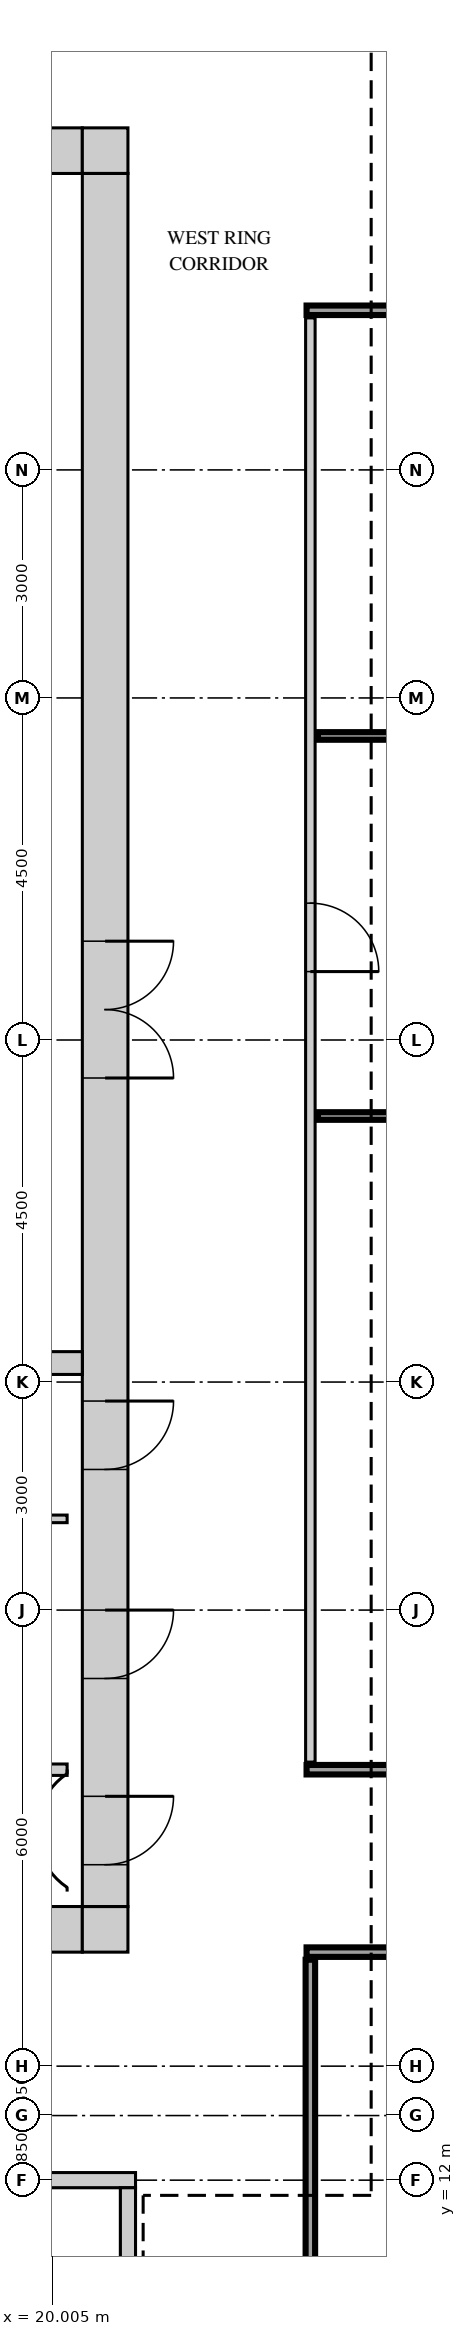
"""IFC4 building model, lengths in metres.
Left out: names, types, materials, properties, quantities, classifications, styles, units other than length and angle.
Written with IfcOpenShell. Run it as: python <this file> out.ifc"""

import sys

from ifc_helpers import new_model, si_unit, direction, frame, frame_2d, origin, place, context, subcontext, project, spatial, rectangle, extrude, source, transform, mapped, element, fill, save


model = new_model("IFC4")
c1 = context("Model", 3, precision=1e-05, world=origin(), true_north=direction((0.0, 1.0)))
c2 = subcontext(c1, "Body", "Model", "MODEL_VIEW")
j1 = project(units=[si_unit("LENGTHUNIT", "METRE"), si_unit("PLANEANGLEUNIT", "RADIAN")], contexts=[c1])
p1 = place(None, origin())
s1 = spatial("IfcSite", under=j1, at=p1, CompositionType="ELEMENT")
p2 = place(p1, origin())
s2 = spatial("IfcBuilding", under=s1, at=p2, CompositionType="ELEMENT")
p3 = place(p2, frame((0.0, 0.0, 310.2)))
s3 = spatial("IfcBuildingStorey", under=s2, at=p3, CompositionType="ELEMENT", Elevation=310.2)
m1 = source(origin(), c2, "Body", "SweptSolid", [
    extrude(rectangle(XDim=14.4, YDim=0.6, at=frame_2d((7.2, 0.0))), origin(), (0.0, 0.0, 1.0), 3.75),
])
p4 = place(p3, frame((6.0, 38.7, 0.0), z_axis=(0.0, 0.0, 1.0), x_axis=(1.0, 0.0, 0.0)))
e1 = element("IfcWall", 1, at=p4, inside=s3, PredefinedType="SHEAR", context=c2, shape_type="MappedRepresentation", body=[
    mapped(m1, transform((0.0, 0.0, 0.0))),
])
m2 = source(origin(), c2, "Body", "SweptSolid", [
    extrude(rectangle(XDim=0.9, YDim=2.1, at=frame_2d((0.45, 1.05))), frame((0.0, 0.31, 0.0), z_axis=(0.0, -1.0, 0.0), x_axis=(1.0, 0.0, 0.0)), (0.0, 0.0, 1.0), 0.62),
])
p5 = place(p4, frame((3.7, 0.0, 0.0)))
e2 = element("IfcOpeningElement", 2, at=p5, cuts=e1, PredefinedType="OPENING", context=c2, shape_type="MappedRepresentation", body=[
    mapped(m2, transform((0.0, 0.0, 0.0))),
])
p6 = place(p4, frame((10.4, 0.0, 0.0)))
e3 = element("IfcOpeningElement", 3, at=p6, cuts=e1, PredefinedType="OPENING", context=c2, shape_type="MappedRepresentation", body=[
    mapped(m2, transform((0.0, 0.0, 0.0))),
])
m3 = source(origin(), c2, "Body", "SweptSolid", [
    extrude(rectangle(XDim=0.6, YDim=0.6, at=frame_2d((0.3, 0.0))), origin(), (0.0, 0.0, 1.0), 3.75),
])
p7 = place(p3, frame((20.4, 38.7, 0.0), z_axis=(0.0, 0.0, 1.0), x_axis=(1.0, 0.0, 0.0)))
e4 = element("IfcWall", 4, at=p7, inside=s3, PredefinedType="SHEAR", context=c2, shape_type="MappedRepresentation", body=[
    mapped(m3, transform((0.0, 0.0, 0.0))),
])
p8 = place(p3, frame((6.0, 15.3, 0.0), z_axis=(0.0, 0.0, 1.0), x_axis=(1.0, 0.0, 0.0)))
e5 = element("IfcWall", 5, at=p8, inside=s3, PredefinedType="SHEAR", context=c2, shape_type="MappedRepresentation", body=[
    mapped(m1, transform((0.0, 0.0, 0.0))),
])
m4 = source(origin(), c2, "Body", "SweptSolid", [
    extrude(rectangle(XDim=1.2, YDim=2.1, at=frame_2d((0.6, 1.05))), frame((0.0, 0.31, 0.0), z_axis=(0.0, -1.0, 0.0), x_axis=(1.0, 0.0, 0.0)), (0.0, 0.0, 1.0), 0.62),
])
p9 = place(p8, frame((6.2, 0.0, 0.0)))
e6 = element("IfcOpeningElement", 6, at=p9, cuts=e5, PredefinedType="OPENING", context=c2, shape_type="MappedRepresentation", body=[
    mapped(m4, transform((0.0, 0.0, 0.0))),
])
p10 = place(p8, frame((2.85, 0.0, 0.0)))
e7 = element("IfcOpeningElement", 7, at=p10, cuts=e5, PredefinedType="OPENING", context=c2, shape_type="MappedRepresentation", body=[
    mapped(m4, transform((0.0, 0.0, 0.0))),
])
m5 = source(origin(), c2, "Body", "SweptSolid", [
    extrude(rectangle(XDim=1.0, YDim=2.1, at=frame_2d((0.5, 1.05))), frame((0.0, 0.31, 0.0), z_axis=(0.0, -1.0, 0.0), x_axis=(1.0, 0.0, 0.0)), (0.0, 0.0, 1.0), 0.62),
])
p11 = place(p8, frame((8.7, 0.0, 0.0)))
e8 = element("IfcOpeningElement", 8, at=p11, cuts=e5, PredefinedType="OPENING", context=c2, shape_type="MappedRepresentation", body=[
    mapped(m5, transform((0.0, 0.0, 0.0))),
])
p12 = place(p3, frame((20.4, 15.3, 0.0), z_axis=(0.0, 0.0, 1.0), x_axis=(1.0, 0.0, 0.0)))
e9 = element("IfcWall", 9, at=p12, inside=s3, PredefinedType="SHEAR", context=c2, shape_type="MappedRepresentation", body=[
    mapped(m3, transform((0.0, 0.0, 0.0))),
])
m6 = source(origin(), c2, "Body", "SweptSolid", [
    extrude(rectangle(XDim=22.8, YDim=0.6, at=frame_2d((11.4, 0.0))), origin(), (0.0, 0.0, 1.0), 3.75),
])
p13 = place(p3, frame((20.7, 15.6, 0.0), z_axis=(0.0, 0.0, 1.0), x_axis=(0.0, 1.0, 0.0)))
e10 = element("IfcWall", 10, at=p13, inside=s3, PredefinedType="SHEAR", context=c2, shape_type="MappedRepresentation", body=[
    mapped(m6, transform((0.0, 0.0, 0.0))),
])
m7 = source(origin(), c2, "Body", "SweptSolid", [
    extrude(rectangle(XDim=1.8, YDim=2.1, at=frame_2d((0.9, 1.05))), frame((0.0, 0.31, 0.0), z_axis=(0.0, -1.0, 0.0), x_axis=(1.0, 0.0, 0.0)), (0.0, 0.0, 1.0), 0.62),
])
p14 = place(p13, frame((10.9, 0.0, 0.0)))
e11 = element("IfcOpeningElement", 11, at=p14, cuts=e10, PredefinedType="OPENING", context=c2, shape_type="MappedRepresentation", body=[
    mapped(m7, transform((0.0, 0.0, 0.0))),
])
p15 = place(p13, frame((0.55, 0.0, 0.0)))
e12 = element("IfcOpeningElement", 12, at=p15, cuts=e10, PredefinedType="OPENING", context=c2, shape_type="MappedRepresentation", body=[
    mapped(m2, transform((0.0, 0.0, 0.0))),
])
p16 = place(p13, frame((3.0, 0.0, 0.0)))
e13 = element("IfcOpeningElement", 13, at=p16, cuts=e10, PredefinedType="OPENING", context=c2, shape_type="MappedRepresentation", body=[
    mapped(m2, transform((0.0, 0.0, 0.0))),
])
p17 = place(p13, frame((5.75, 0.0, 0.0)))
e14 = element("IfcOpeningElement", 14, at=p17, cuts=e10, PredefinedType="OPENING", context=c2, shape_type="MappedRepresentation", body=[
    mapped(m2, transform((0.0, 0.0, 0.0))),
])
m8 = source(origin(), c2, "Body", "SweptSolid", [
    extrude(rectangle(XDim=7.2, YDim=0.2, at=frame_2d((3.6, 0.0))), origin(), (0.0, 0.0, 1.0), 3.75),
])
p18 = place(p3, frame((13.9, 12.0, 0.0), z_axis=(0.0, 0.0, 1.0), x_axis=(1.0, 0.0, 0.0)))
e15 = element("IfcWall", 15, at=p18, inside=s3, PredefinedType="SHEAR", context=c2, shape_type="MappedRepresentation", body=[
    mapped(m8, transform((0.0, 0.0, 0.0))),
])
m9 = source(origin(), c2, "Body", "SweptSolid", [
    extrude(rectangle(XDim=3.35, YDim=0.2, at=frame_2d((1.675, 0.0))), origin(), (0.0, 0.0, 1.0), 3.75),
])
p19 = place(p3, frame((21.0, 8.55, 0.0), z_axis=(0.0, 0.0, 1.0), x_axis=(0.0, 1.0, 0.0)))
e16 = element("IfcWall", 16, at=p19, inside=s3, PredefinedType="SHEAR", context=c2, shape_type="MappedRepresentation", body=[
    mapped(m9, transform((0.0, 0.0, 0.0))),
])
m10 = source(origin(), c2, "Body", "SweptSolid", [
    extrude(rectangle(XDim=13.2, YDim=0.3, at=frame_2d((6.6, 0.0))), origin(), (0.0, 0.0, 1.0), 3.75),
])
p20 = place(p3, frame((7.2, 22.75, 0.0), z_axis=(0.0, 0.0, 1.0), x_axis=(1.0, 0.0, 0.0)))
e17 = element("IfcWall", 17, at=p20, inside=s3, PredefinedType="STANDARD", context=c2, shape_type="MappedRepresentation", body=[
    mapped(m10, transform((0.0, 0.0, 0.0))),
])
m11 = source(origin(), c2, "Body", "SweptSolid", [
    extrude(rectangle(XDim=8.75, YDim=0.125, at=frame_2d((4.375, 0.0))), origin(), (0.0, 0.0, 1.0), 3.8),
])
p21 = place(p3, frame((23.4, 6.15, 0.0), z_axis=(0.0, 0.0, 1.0), x_axis=(0.0, 1.0, 0.0)))
e18 = element("IfcWall", 18, at=p21, inside=s3, PredefinedType="PARTITIONING", context=c2, shape_type="MappedRepresentation", body=[
    mapped(m11, transform((0.0, 0.0, 0.0))),
])
m12 = source(origin(), c2, "Body", "SweptSolid", [
    extrude(rectangle(XDim=19.1, YDim=0.125, at=frame_2d((9.55, 0.0))), origin(), (0.0, 0.0, 1.0), 3.8),
])
p22 = place(p3, frame((23.35, 15.0, 0.0), z_axis=(0.0, 0.0, 1.0), x_axis=(1.0, 0.0, 0.0)))
e19 = element("IfcWall", 19, at=p22, inside=s3, PredefinedType="PARTITIONING", context=c2, shape_type="MappedRepresentation", body=[
    mapped(m12, transform((0.0, 0.0, 0.0))),
])
m13 = source(origin(), c2, "Body", "SweptSolid", [
    extrude(rectangle(XDim=1.2, YDim=2.1, at=frame_2d((0.6, 1.05))), frame((0.0, 0.073, 0.0), z_axis=(0.0, -1.0, 0.0), x_axis=(1.0, 0.0, 0.0)), (0.0, 0.0, 1.0), 0.145),
])
p23 = place(p22, frame((7.75, 0.0, 0.0)))
e20 = element("IfcOpeningElement", 20, at=p23, cuts=e19, PredefinedType="OPENING", context=c2, shape_type="MappedRepresentation", body=[
    mapped(m13, transform((0.0, 0.0, 0.0))),
])
m14 = source(origin(), c2, "Body", "SweptSolid", [
    extrude(rectangle(XDim=4.0, YDim=0.15, at=frame_2d((2.0, 0.0))), origin(), (0.0, 0.0, 1.0), 3.8),
])
p24 = place(p3, frame((16.2, 17.4, 0.0), z_axis=(0.0, 0.0, 1.0), x_axis=(1.0, 0.0, 0.0)))
e21 = element("IfcWall", 21, at=p24, inside=s3, PredefinedType="PARTITIONING", context=c2, shape_type="MappedRepresentation", body=[
    mapped(m14, transform((0.0, 0.0, 0.0))),
])
m15 = source(origin(), c2, "Body", "SweptSolid", [
    extrude(rectangle(XDim=16.7, YDim=0.125, at=frame_2d((8.35, 0.0))), origin(), (0.0, 0.0, 1.0), 3.8),
])
p25 = place(p3, frame((23.35, 17.4, 0.0), z_axis=(0.0, 0.0, 1.0), x_axis=(1.0, 0.0, 0.0)))
e22 = element("IfcWall", 22, at=p25, inside=s3, PredefinedType="PARTITIONING", context=c2, shape_type="MappedRepresentation", body=[
    mapped(m15, transform((0.0, 0.0, 0.0))),
])
p26 = place(p25, frame((7.75, 0.0, 0.0)))
e23 = element("IfcOpeningElement", 23, at=p26, cuts=e22, PredefinedType="OPENING", context=c2, shape_type="MappedRepresentation", body=[
    mapped(m13, transform((0.0, 0.0, 0.0))),
])
m16 = source(origin(), c2, "Body", "SweptSolid", [
    extrude(rectangle(XDim=19.0, YDim=0.125, at=frame_2d((9.5, 0.0))), origin(), (0.0, 0.0, 1.0), 3.8),
])
p27 = place(p3, frame((23.4, 17.5, 0.0), z_axis=(0.0, 0.0, 1.0), x_axis=(0.0, 1.0, 0.0)))
e24 = element("IfcWall", 24, at=p27, inside=s3, PredefinedType="PARTITIONING", context=c2, shape_type="MappedRepresentation", body=[
    mapped(m16, transform((0.0, 0.0, 0.0))),
])
m17 = source(origin(), c2, "Body", "SweptSolid", [
    extrude(rectangle(XDim=0.9, YDim=2.1, at=frame_2d((0.45, 1.05))), frame((0.0, 0.073, 0.0), z_axis=(0.0, -1.0, 0.0), x_axis=(1.0, 0.0, 0.0)), (0.0, 0.0, 1.0), 0.145),
])
p28 = place(p27, frame((10.4, 0.0, 0.0)))
e25 = element("IfcOpeningElement", 25, at=p28, cuts=e24, PredefinedType="OPENING", context=c2, shape_type="MappedRepresentation", body=[
    mapped(m17, transform((0.0, 0.0, 0.0))),
])
m18 = source(origin(), c2, "Body", "SweptSolid", [
    extrude(rectangle(XDim=4.1, YDim=0.1, at=frame_2d((2.05, 0.0))), origin(), (0.0, 0.0, 1.0), 3.8),
])
p29 = place(p3, frame((16.1, 20.7, 0.0), z_axis=(0.0, 0.0, 1.0), x_axis=(1.0, 0.0, 0.0)))
e26 = element("IfcWall", 26, at=p29, inside=s3, PredefinedType="PARTITIONING", context=c2, shape_type="MappedRepresentation", body=[
    mapped(m18, transform((0.0, 0.0, 0.0))),
])
m19 = source(origin(), c2, "Body", "SweptSolid", [
    extrude(rectangle(XDim=16.4, YDim=0.1, at=frame_2d((8.2, 0.0))), origin(), (0.0, 0.0, 1.0), 3.8),
])
for number, where, z_axis, x_axis in (
    (27, (23.5, 26.0, 0.0), (0.0, 0.0, 1.0), (1.0, 0.0, 0.0)),
    (28, (23.5, 31.0, 0.0), (0.0, 0.0, 1.0), (1.0, 0.0, 0.0)),
):
    element("IfcWall", number, at=place(p3, frame(where, z_axis=z_axis, x_axis=x_axis)), inside=s3, PredefinedType="PARTITIONING", context=c2, shape_type="MappedRepresentation", body=[
        mapped(m19, transform((0.0, 0.0, 0.0))),
    ])
p30 = place(p3, frame((23.35, 36.6, 0.0), z_axis=(0.0, 0.0, 1.0), x_axis=(1.0, 0.0, 0.0)))
e29 = element("IfcWall", 29, at=p30, inside=s3, PredefinedType="PARTITIONING", context=c2, shape_type="MappedRepresentation", body=[
    mapped(m15, transform((0.0, 0.0, 0.0))),
])
p31 = place(p30, frame((8.05, 0.0, 0.0)))
e30 = element("IfcOpeningElement", 30, at=p31, cuts=e29, PredefinedType="OPENING", context=c2, shape_type="MappedRepresentation", body=[
    mapped(m17, transform((0.0, 0.0, 0.0))),
])
m20 = source(origin(), c2, "Body", "SweptSolid", [
    extrude(rectangle(XDim=1.8, YDim=2.1, at=frame_2d((0.9, 1.05))), frame((0.0, 0.25, 0.0), z_axis=(0.0, -1.0, 0.0), x_axis=(1.0, 0.0, 0.0)), (0.0, 0.0, 1.0), 0.5),
])
p32 = place(p14, origin())
e31 = element("IfcDoor", 31, at=p32, inside=s3, OperationType="DOUBLE_DOOR_SINGLE_SWING", PredefinedType="DOOR", context=c2, shape_type="MappedRepresentation", body=[
    mapped(m20, transform((0.0, 0.0, 0.0))),
])
fill(e11, e31)
m21 = source(origin(), c2, "Body", "SweptSolid", [
    extrude(rectangle(XDim=0.9, YDim=2.1, at=frame_2d((0.45, 1.05))), frame((0.0, 0.25, 0.0), z_axis=(0.0, -1.0, 0.0), x_axis=(1.0, 0.0, 0.0)), (0.0, 0.0, 1.0), 0.5),
])
p33 = place(p15, origin())
e32 = element("IfcDoor", 32, at=p33, inside=s3, OperationType="SINGLE_SWING_RIGHT", PredefinedType="DOOR", context=c2, shape_type="MappedRepresentation", body=[
    mapped(m21, transform((0.0, 0.0, 0.0))),
])
fill(e12, e32)
p34 = place(p16, origin())
e33 = element("IfcDoor", 33, at=p34, inside=s3, OperationType="SINGLE_SWING_RIGHT", PredefinedType="DOOR", context=c2, shape_type="MappedRepresentation", body=[
    mapped(m21, transform((0.0, 0.0, 0.0))),
])
fill(e13, e33)
p35 = place(p17, origin())
e34 = element("IfcDoor", 34, at=p35, inside=s3, OperationType="SINGLE_SWING_RIGHT", PredefinedType="DOOR", context=c2, shape_type="MappedRepresentation", body=[
    mapped(m21, transform((0.0, 0.0, 0.0))),
])
fill(e14, e34)
m22 = source(origin(), c2, "Body", "SweptSolid", [
    extrude(rectangle(XDim=0.9, YDim=2.1, at=frame_2d((0.45, 1.05))), frame((0.0, 0.025, 0.0), z_axis=(0.0, -1.0, 0.0), x_axis=(1.0, 0.0, 0.0)), (0.0, 0.0, 1.0), 0.05),
])
p36 = place(p28, origin())
e35 = element("IfcDoor", 35, at=p36, inside=s3, OperationType="SINGLE_SWING_LEFT", PredefinedType="DOOR", context=c2, shape_type="MappedRepresentation", body=[
    mapped(m22, transform((0.0, 0.0, 0.0))),
])
fill(e25, e35)
save(model, sys.argv[1])
